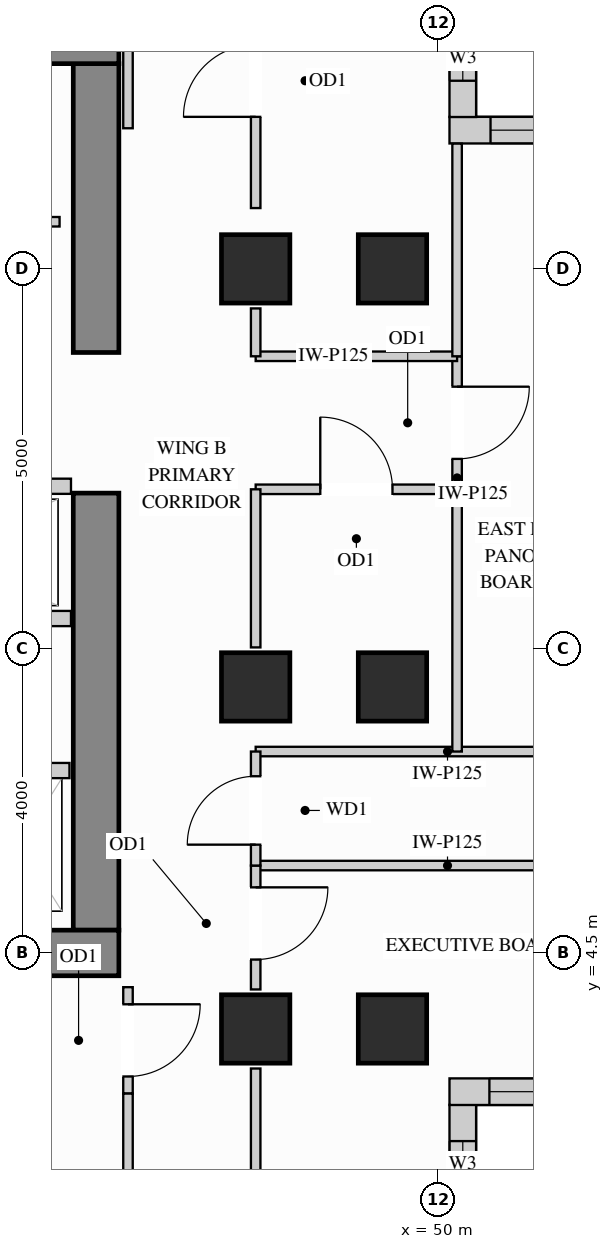
"""IFC4 building model, lengths in metres.
Left out: names, types, materials, properties, quantities, classifications, styles, units other than length and angle.
Written with IfcOpenShell. Run it as: python <this file> out.ifc"""

import sys

from ifc_helpers import new_model, si_unit, direction, frame, frame_2d, origin, origin_2d, place, context, subcontext, project, spatial, rectangle, extrude, source, transform, mapped, element, fill, save


model = new_model("IFC4")
c1 = context("Model", 3, precision=1e-05, world=origin(), true_north=direction((0.0, 1.0)))
c2 = subcontext(c1, "Body", "Model", "MODEL_VIEW")
j1 = project(units=[si_unit("LENGTHUNIT", "METRE"), si_unit("PLANEANGLEUNIT", "RADIAN")], contexts=[c1])
p1 = place(None, origin())
s1 = spatial("IfcSite", under=j1, at=p1, CompositionType="ELEMENT")
p2 = place(p1, origin())
s2 = spatial("IfcBuilding", under=s1, at=p2, CompositionType="ELEMENT")
p3 = place(p2, frame((0.0, 0.0, 204.3)))
s3 = spatial("IfcBuildingStorey", under=s2, at=p3, CompositionType="ELEMENT", Elevation=204.3)
m1 = source(origin(), c2, "Body", "SweptSolid", [
    extrude(rectangle(XDim=0.9, YDim=0.9, at=origin_2d()), origin(), (0.0, 0.0, 1.0), 3.32),
])
for number, where, z_axis, x_axis in (
    (1, (47.6, 13.5, 0.0), (0.0, 0.0, 1.0), (1.0, 0.0, 0.0)),
    (2, (47.6, 3.5, 0.0), (0.0, 0.0, 1.0), (1.0, 0.0, 0.0)),
    (3, (47.6, 8.0, 0.0), (0.0, 0.0, 1.0), (1.0, 0.0, 0.0)),
    (4, (49.4, 13.5, 0.0), (0.0, 0.0, 1.0), (1.0, 0.0, 0.0)),
    (5, (49.4, 3.5, 0.0), (0.0, 0.0, 1.0), (1.0, 0.0, 0.0)),
    (6, (49.4, 8.0, 0.0), (0.0, 0.0, 1.0), (1.0, 0.0, 0.0)),
):
    element("IfcColumn", number, at=place(p3, frame(where, z_axis=z_axis, x_axis=x_axis)), inside=s3, PredefinedType="COLUMN", context=c2, shape_type="MappedRepresentation", body=[
        mapped(m1, transform((0.0, 0.0, 0.0), x_axis=(1.0, 0.0, 0.0), y_axis=(0.0, 1.0, 0.0), z_axis=(0.0, 0.0, 1.0))),
    ])
m2 = source(origin(), c2, "Body", "SweptSolid", [
    extrude(rectangle(XDim=5.75, YDim=0.6, at=frame_2d((2.875, 0.0))), origin(), (0.0, 0.0, 1.0), 3.32),
])
p4 = place(p3, frame((45.5, 4.8, 0.0), z_axis=(0.0, 0.0, 1.0), x_axis=(0.0, 1.0, 0.0)))
e7 = element("IfcWall", 7, at=p4, inside=s3, PredefinedType="SHEAR", context=c2, shape_type="MappedRepresentation", body=[
    mapped(m2, transform((0.0, 0.0, 0.0), x_axis=(1.0, 0.0, 0.0), y_axis=(0.0, 1.0, 0.0), z_axis=(0.0, 0.0, 1.0))),
])
m3 = source(origin(), c2, "Body", "SweptSolid", [
    extrude(rectangle(XDim=3.8, YDim=0.6, at=frame_2d((1.9, 0.0))), origin(), (0.0, 0.0, 1.0), 3.32),
])
p5 = place(p3, frame((45.5, 12.4, 0.0), z_axis=(0.0, 0.0, 1.0), x_axis=(0.0, 1.0, 0.0)))
e8 = element("IfcWall", 8, at=p5, inside=s3, PredefinedType="SHEAR", context=c2, shape_type="MappedRepresentation", body=[
    mapped(m3, transform((0.0, 0.0, 0.0), x_axis=(1.0, 0.0, 0.0), y_axis=(0.0, 1.0, 0.0), z_axis=(0.0, 0.0, 1.0))),
])
m4 = source(origin(), c2, "Body", "SweptSolid", [
    extrude(rectangle(XDim=10.1, YDim=0.6, at=frame_2d((5.05, 0.0))), origin(), (0.0, 0.0, 1.0), 3.32),
])
for number, where, z_axis, x_axis in (
    (9, (35.7, 16.5, 0.0), (0.0, 0.0, 1.0), (1.0, 0.0, 0.0)),
    (10, (35.7, 4.5, 0.0), (0.0, 0.0, 1.0), (1.0, 0.0, 0.0)),
):
    element("IfcWall", number, at=place(p3, frame(where, z_axis=z_axis, x_axis=x_axis)), inside=s3, PredefinedType="SHEAR", context=c2, shape_type="MappedRepresentation", body=[
        mapped(m4, transform((0.0, 0.0, 0.0), x_axis=(1.0, 0.0, 0.0), y_axis=(0.0, 1.0, 0.0), z_axis=(0.0, 0.0, 1.0))),
    ])
p6 = place(p3, frame((50.325, 0.348, 0.0), z_axis=(0.0, 0.0, 1.0), x_axis=(0.0, 1.0, 0.0)))
e11 = element("IfcWall", 11, at=p6, inside=s3, PredefinedType="SOLIDWALL", context=c2, shape_type="SweptSolid", body=[
    extrude(rectangle(XDim=2.154, YDim=0.35, at=frame_2d((1.077, 0.0))), origin(), (0.0, 0.0, 1.0), 3.305),
])
p7 = place(p6, frame((0.477, 0.0, 0.78)))
e12 = element("IfcOpeningElement", 12, at=p7, cuts=e11, PredefinedType="OPENING", context=c2, shape_type="SweptSolid", body=[
    extrude(rectangle(XDim=1.2, YDim=2.1, at=frame_2d((0.6, 1.05))), frame((0.0, 0.185, 0.0), z_axis=(0.0, -1.0, 0.0), x_axis=(1.0, 0.0, 0.0)), (0.0, 0.0, 1.0), 0.37),
])
p8 = place(p3, frame((50.15, 2.675, 0.0), z_axis=(0.0, 0.0, 1.0), x_axis=(1.0, 0.0, 0.0)))
e13 = element("IfcWall", 13, at=p8, inside=s3, PredefinedType="SOLIDWALL", context=c2, shape_type="SweptSolid", body=[
    extrude(rectangle(XDim=2.85, YDim=0.35, at=frame_2d((1.425, 0.0))), origin(), (0.0, 0.0, 1.0), 3.305),
])
p9 = place(p8, frame((0.525, 0.0, 0.78)))
e14 = element("IfcOpeningElement", 14, at=p9, cuts=e13, PredefinedType="OPENING", context=c2, shape_type="SweptSolid", body=[
    extrude(rectangle(XDim=1.8, YDim=2.1, at=frame_2d((0.9, 1.05))), frame((0.0, 0.185, 0.0), z_axis=(0.0, -1.0, 0.0), x_axis=(1.0, 0.0, 0.0)), (0.0, 0.0, 1.0), 0.37),
])
p10 = place(p3, frame((53.0, 15.325, 0.0), z_axis=(0.0, 0.0, 1.0), x_axis=(-1.0, 0.0, 0.0)))
e15 = element("IfcWall", 15, at=p10, inside=s3, PredefinedType="SOLIDWALL", context=c2, shape_type="SweptSolid", body=[
    extrude(rectangle(XDim=2.85, YDim=0.35, at=frame_2d((1.425, 0.0))), origin(), (0.0, 0.0, 1.0), 3.305),
])
p11 = place(p10, frame((0.51, 0.0, 0.78)))
e16 = element("IfcOpeningElement", 16, at=p11, cuts=e15, PredefinedType="OPENING", context=c2, shape_type="SweptSolid", body=[
    extrude(rectangle(XDim=1.8, YDim=2.1, at=frame_2d((0.9, 1.05))), frame((0.0, 0.185, 0.0), z_axis=(0.0, -1.0, 0.0), x_axis=(1.0, 0.0, 0.0)), (0.0, 0.0, 1.0), 0.37),
])
p12 = place(p3, frame((50.325, 15.498, 0.0), z_axis=(0.0, 0.0, 1.0), x_axis=(0.0, 1.0, 0.0)))
e17 = element("IfcWall", 17, at=p12, inside=s3, PredefinedType="SOLIDWALL", context=c2, shape_type="SweptSolid", body=[
    extrude(rectangle(XDim=2.154, YDim=0.35, at=frame_2d((1.077, 0.0))), origin(), (0.0, 0.0, 1.0), 3.305),
])
p13 = place(p12, frame((0.477, 0.0, 0.78)))
e18 = element("IfcOpeningElement", 18, at=p13, cuts=e17, PredefinedType="OPENING", context=c2, shape_type="SweptSolid", body=[
    extrude(rectangle(XDim=1.2, YDim=2.1, at=frame_2d((0.6, 1.05))), frame((0.0, 0.185, 0.0), z_axis=(0.0, -1.0, 0.0), x_axis=(1.0, 0.0, 0.0)), (0.0, 0.0, 1.0), 0.37),
])
p14 = place(p3, frame((40.75, 14.12, 0.0), z_axis=(0.0, 0.0, 1.0), x_axis=(1.0, 0.0, 0.0)))
e19 = element("IfcWall", 19, at=p14, inside=s3, PredefinedType="PARTITIONING", context=c2, shape_type="SweptSolid", body=[
    extrude(rectangle(XDim=4.27, YDim=0.125, at=frame_2d((2.135, 0.0))), origin(), (0.0, 0.0, 1.0), 3.305),
])
p15 = place(p14, frame((1.66, 0.0, 0.0)))
e20 = element("IfcOpeningElement", 20, at=p15, cuts=e19, PredefinedType="OPENING", context=c2, shape_type="SweptSolid", body=[
    extrude(rectangle(XDim=0.95, YDim=2.15, at=frame_2d((0.475, 1.075))), frame((0.0, 0.073, 0.0), z_axis=(0.0, -1.0, 0.0), x_axis=(1.0, 0.0, 0.0)), (0.0, 0.0, 1.0), 0.145),
])
p16 = place(p3, frame((50.25, 10.6, 0.0), z_axis=(0.0, 0.0, 1.0), x_axis=(0.0, 1.0, 0.0)))
e21 = element("IfcWall", 21, at=p16, inside=s3, PredefinedType="PARTITIONING", context=c2, shape_type="SweptSolid", body=[
    extrude(rectangle(XDim=1.75, YDim=0.125, at=frame_2d((0.875, 0.0))), origin(), (0.0, 0.0, 1.0), 3.305),
])
p17 = place(p16, frame((0.4, 0.0, 0.0)))
e22 = element("IfcOpeningElement", 22, at=p17, cuts=e21, PredefinedType="OPENING", context=c2, shape_type="SweptSolid", body=[
    extrude(rectangle(XDim=0.95, YDim=2.15, at=frame_2d((0.475, 1.075))), frame((0.0, 0.073, 0.0), z_axis=(0.0, -1.0, 0.0), x_axis=(1.0, 0.0, 0.0)), (0.0, 0.0, 1.0), 0.145),
])
m5 = source(origin(), c2, "Body", "SweptSolid", [
    extrude(rectangle(XDim=5.048, YDim=0.125, at=frame_2d((2.524, 0.0))), origin(), (0.0, 0.0, 1.0), 3.305),
])
for number, where, z_axis, x_axis in (
    (23, (47.6, 5.65, 0.0), (0.0, 0.0, 1.0), (1.0, 0.0, 0.0)),
    (24, (47.6, 7.15, 0.0), (0.0, 0.0, 1.0), (1.0, 0.0, 0.0)),
):
    element("IfcWall", number, at=place(p3, frame(where, z_axis=z_axis, x_axis=x_axis)), inside=s3, PredefinedType="PARTITIONING", context=c2, shape_type="MappedRepresentation", body=[
        mapped(m5, transform((0.0, 0.0, 0.0), x_axis=(1.0, 0.0, 0.0), y_axis=(0.0, 1.0, 0.0), z_axis=(0.0, 0.0, 1.0))),
    ])
m6 = source(origin(), c2, "Body", "SweptSolid", [
    extrude(rectangle(XDim=2.65, YDim=0.125, at=frame_2d((1.325, 0.0))), origin(), (0.0, 0.0, 1.0), 3.305),
])
p18 = place(p3, frame((47.6, 12.35, 0.0), z_axis=(0.0, 0.0, 1.0), x_axis=(1.0, 0.0, 0.0)))
e25 = element("IfcWall", 25, at=p18, inside=s3, PredefinedType="PARTITIONING", context=c2, shape_type="MappedRepresentation", body=[
    mapped(m6, transform((0.0, 0.0, 0.0), x_axis=(1.0, 0.0, 0.0), y_axis=(0.0, 1.0, 0.0), z_axis=(0.0, 0.0, 1.0))),
])
p19 = place(p3, frame((47.6, 10.6, 0.0), z_axis=(0.0, 0.0, 1.0), x_axis=(1.0, 0.0, 0.0)))
e26 = element("IfcWall", 26, at=p19, inside=s3, PredefinedType="PARTITIONING", context=c2, shape_type="SweptSolid", body=[
    extrude(rectangle(XDim=2.65, YDim=0.125, at=frame_2d((1.325, 0.0))), origin(), (0.0, 0.0, 1.0), 2.693),
])
p20 = place(p19, frame((0.85, 0.0, 0.0)))
e27 = element("IfcOpeningElement", 27, at=p20, cuts=e26, PredefinedType="OPENING", context=c2, shape_type="SweptSolid", body=[
    extrude(rectangle(XDim=0.95, YDim=2.15, at=frame_2d((0.475, 1.075))), frame((0.0, 0.073, 0.0), z_axis=(0.0, -1.0, 0.0), x_axis=(1.0, 0.0, 0.0)), (0.0, 0.0, 1.0), 0.145),
])
m7 = source(origin(), c2, "Body", "SweptSolid", [
    extrude(rectangle(XDim=3.45, YDim=0.125, at=frame_2d((1.725, 0.0))), origin(), (0.0, 0.0, 1.0), 3.305),
])
p21 = place(p3, frame((50.25, 7.15, 0.0), z_axis=(0.0, 0.0, 1.0), x_axis=(0.0, 1.0, 0.0)))
e28 = element("IfcWall", 28, at=p21, inside=s3, PredefinedType="PARTITIONING", context=c2, shape_type="MappedRepresentation", body=[
    mapped(m7, transform((0.0, 0.0, 0.0), x_axis=(1.0, 0.0, 0.0), y_axis=(0.0, 1.0, 0.0), z_axis=(0.0, 0.0, 1.0))),
])
m8 = source(origin(), c2, "Body", "SweptSolid", [
    extrude(rectangle(XDim=2.798, YDim=0.125, at=frame_2d((1.399, 0.0))), origin(), (0.0, 0.0, 1.0), 3.305),
])
p22 = place(p3, frame((50.25, 12.35, 0.0), z_axis=(0.0, 0.0, 1.0), x_axis=(0.0, 1.0, 0.0)))
e29 = element("IfcWall", 29, at=p22, inside=s3, PredefinedType="PARTITIONING", context=c2, shape_type="MappedRepresentation", body=[
    mapped(m8, transform((0.0, 0.0, 0.0), x_axis=(1.0, 0.0, 0.0), y_axis=(0.0, 1.0, 0.0), z_axis=(0.0, 0.0, 1.0))),
])
p23 = place(p3, frame((47.6, 4.02, 0.0), z_axis=(0.0, 0.0, 1.0), x_axis=(0.0, 1.0, 0.0)))
e30 = element("IfcWall", 30, at=p23, inside=s3, PredefinedType="PARTITIONING", context=c2, shape_type="SweptSolid", body=[
    extrude(rectangle(XDim=1.63, YDim=0.125, at=frame_2d((0.815, 0.0))), origin(), (0.0, 0.0, 1.0), 2.693),
])
p24 = place(p23, frame((0.393, 0.0, 0.0)))
e31 = element("IfcOpeningElement", 31, at=p24, cuts=e30, PredefinedType="OPENING", context=c2, shape_type="SweptSolid", body=[
    extrude(rectangle(XDim=0.95, YDim=2.15, at=frame_2d((0.475, 1.075))), frame((0.0, 0.073, 0.0), z_axis=(0.0, -1.0, 0.0), x_axis=(1.0, 0.0, 0.0)), (0.0, 0.0, 1.0), 0.145),
])
m9 = source(origin(), c2, "Body", "SweptSolid", [
    extrude(rectangle(XDim=1.86, YDim=0.125, at=frame_2d((0.93, 0.0))), origin(), (0.0, 0.0, 1.0), 2.693),
])
p25 = place(p3, frame((47.6, 1.12, 0.0), z_axis=(0.0, 0.0, 1.0), x_axis=(0.0, 1.0, 0.0)))
e32 = element("IfcWall", 32, at=p25, inside=s3, PredefinedType="PARTITIONING", context=c2, shape_type="MappedRepresentation", body=[
    mapped(m9, transform((0.0, 0.0, 0.0), x_axis=(1.0, 0.0, 0.0), y_axis=(0.0, 1.0, 0.0), z_axis=(0.0, 0.0, 1.0))),
])
m10 = source(origin(), c2, "Body", "SweptSolid", [
    extrude(rectangle(XDim=2.08, YDim=0.125, at=frame_2d((1.04, 0.0))), origin(), (0.0, 0.0, 1.0), 2.693),
])
p26 = place(p3, frame((47.6, 8.52, 0.0), z_axis=(0.0, 0.0, 1.0), x_axis=(0.0, 1.0, 0.0)))
e33 = element("IfcWall", 33, at=p26, inside=s3, PredefinedType="PARTITIONING", context=c2, shape_type="MappedRepresentation", body=[
    mapped(m10, transform((0.0, 0.0, 0.0), x_axis=(1.0, 0.0, 0.0), y_axis=(0.0, 1.0, 0.0), z_axis=(0.0, 0.0, 1.0))),
])
p27 = place(p3, frame((47.6, 14.3, 0.0), z_axis=(0.0, 0.0, 1.0), x_axis=(0.0, 1.0, 0.0)))
e34 = element("IfcWall", 34, at=p27, inside=s3, PredefinedType="PARTITIONING", context=c2, shape_type="SweptSolid", body=[
    extrude(rectangle(XDim=2.58, YDim=0.125, at=frame_2d((1.29, 0.0))), origin(), (0.0, 0.0, 1.0), 2.693),
])
p28 = place(p27, frame((1.2, 0.0, 0.0)))
e35 = element("IfcOpeningElement", 35, at=p28, cuts=e34, PredefinedType="OPENING", context=c2, shape_type="SweptSolid", body=[
    extrude(rectangle(XDim=0.95, YDim=2.15, at=frame_2d((0.475, 1.075))), frame((0.0, 0.073, 0.0), z_axis=(0.0, -1.0, 0.0), x_axis=(1.0, 0.0, 0.0)), (0.0, 0.0, 1.0), 0.145),
])
m11 = source(origin(), c2, "Body", "SweptSolid", [
    extrude(rectangle(XDim=0.63, YDim=0.125, at=frame_2d((0.315, 0.0))), origin(), (0.0, 0.0, 1.0), 2.693),
])
p29 = place(p3, frame((47.6, 12.35, 0.0), z_axis=(0.0, 0.0, 1.0), x_axis=(0.0, 1.0, 0.0)))
e36 = element("IfcWall", 36, at=p29, inside=s3, PredefinedType="PARTITIONING", context=c2, shape_type="MappedRepresentation", body=[
    mapped(m11, transform((0.0, 0.0, 0.0), x_axis=(1.0, 0.0, 0.0), y_axis=(0.0, 1.0, 0.0), z_axis=(0.0, 0.0, 1.0))),
])
p30 = place(p3, frame((47.6, 5.65, 0.0), z_axis=(0.0, 0.0, 1.0), x_axis=(0.0, 1.0, 0.0)))
e37 = element("IfcWall", 37, at=p30, inside=s3, PredefinedType="PARTITIONING", context=c2, shape_type="SweptSolid", body=[
    extrude(rectangle(XDim=1.5, YDim=0.125, at=frame_2d((0.75, 0.0))), origin(), (0.0, 0.0, 1.0), 2.693),
])
p31 = place(p30, frame((0.275, 0.0, 0.0)))
e38 = element("IfcOpeningElement", 38, at=p31, cuts=e37, PredefinedType="OPENING", context=c2, shape_type="SweptSolid", body=[
    extrude(rectangle(XDim=0.9, YDim=2.15, at=frame_2d((0.45, 1.075))), frame((0.0, 0.073, 0.0), z_axis=(0.0, -1.0, 0.0), x_axis=(1.0, 0.0, 0.0)), (0.0, 0.0, 1.0), 0.145),
])
m12 = source(origin(), c2, "Body", "SweptSolid", [
    extrude(rectangle(XDim=2.298, YDim=0.125, at=frame_2d((1.149, 0.0))), origin(), (0.0, 0.0, 1.0), 3.305),
])
p32 = place(p3, frame((45.92, 15.35, 0.0), z_axis=(0.0, 0.0, 1.0), x_axis=(0.0, 1.0, 0.0)))
e39 = element("IfcWall", 39, at=p32, inside=s3, PredefinedType="PARTITIONING", context=c2, shape_type="MappedRepresentation", body=[
    mapped(m12, transform((0.0, 0.0, 0.0), x_axis=(1.0, 0.0, 0.0), y_axis=(0.0, 1.0, 0.0), z_axis=(0.0, 0.0, 1.0))),
])
p33 = place(p3, frame((45.92, 2.65, 0.0), z_axis=(0.0, 0.0, 1.0), x_axis=(0.0, 1.0, 0.0)))
e40 = element("IfcWall", 40, at=p33, inside=s3, PredefinedType="PARTITIONING", context=c2, shape_type="SweptSolid", body=[
    extrude(rectangle(XDim=1.4, YDim=0.125, at=frame_2d((0.7, 0.0))), origin(), (0.0, 0.0, 1.0), 3.305),
])
p34 = place(p33, frame((0.225, 0.0, 0.0)))
e41 = element("IfcOpeningElement", 41, at=p34, cuts=e40, PredefinedType="OPENING", context=c2, shape_type="SweptSolid", body=[
    extrude(rectangle(XDim=0.95, YDim=2.15, at=frame_2d((0.475, 1.075))), frame((0.0, 0.073, 0.0), z_axis=(0.0, -1.0, 0.0), x_axis=(1.0, 0.0, 0.0)), (0.0, 0.0, 1.0), 0.145),
])
p35 = place(p3, frame((45.92, 0.352, 0.0), z_axis=(0.0, 0.0, 1.0), x_axis=(0.0, 1.0, 0.0)))
e42 = element("IfcWall", 42, at=p35, inside=s3, PredefinedType="PARTITIONING", context=c2, shape_type="MappedRepresentation", body=[
    mapped(m12, transform((0.0, 0.0, 0.0), x_axis=(1.0, 0.0, 0.0), y_axis=(0.0, 1.0, 0.0), z_axis=(0.0, 0.0, 1.0))),
])
m13 = source(origin(), c2, "Body", "SweptSolid", [
    extrude(rectangle(XDim=1.3, YDim=0.2, at=frame_2d((0.65, 0.0))), origin(), (0.0, 0.0, 1.0), 3.305),
])
p36 = place(p3, frame((43.85, 6.9, 0.0), z_axis=(0.0, 0.0, 1.0), x_axis=(1.0, 0.0, 0.0)))
e43 = element("IfcWall", 43, at=p36, inside=s3, PredefinedType="PARTITIONING", context=c2, shape_type="MappedRepresentation", body=[
    mapped(m13, transform((0.0, 0.0, 0.0), x_axis=(1.0, 0.0, 0.0), y_axis=(0.0, 1.0, 0.0), z_axis=(0.0, 0.0, 1.0))),
])
m14 = source(origin(), c2, "Body", "SweptSolid", [
    extrude(rectangle(XDim=3.49, YDim=0.2, at=frame_2d((1.745, 0.0))), origin(), (0.0, 0.0, 1.0), 3.305),
])
for number, where, z_axis, x_axis in (
    (44, (41.68, 10.64, 0.0), (0.0, 0.0, 1.0), (1.0, 0.0, 0.0)),
    (45, (41.68, 8.9, 0.0), (0.0, 0.0, 1.0), (1.0, 0.0, 0.0)),
):
    element("IfcWall", number, at=place(p3, frame(where, z_axis=z_axis, x_axis=x_axis)), inside=s3, PredefinedType="PARTITIONING", context=c2, shape_type="MappedRepresentation", body=[
        mapped(m14, transform((0.0, 0.0, 0.0), x_axis=(1.0, 0.0, 0.0), y_axis=(0.0, 1.0, 0.0), z_axis=(0.0, 0.0, 1.0))),
    ])
m15 = source(origin(), c2, "Body", "SweptSolid", [
    extrude(rectangle(XDim=0.95, YDim=2.15, at=frame_2d((0.475, 1.075))), frame((0.0, 0.025, 0.0), z_axis=(0.0, -1.0, 0.0), x_axis=(1.0, 0.0, 0.0)), (0.0, 0.0, 1.0), 0.05),
])
p37 = place(p34, origin())
e46 = element("IfcDoor", 46, at=p37, inside=s3, OperationType="SINGLE_SWING_RIGHT", PredefinedType="DOOR", context=c2, shape_type="MappedRepresentation", body=[
    mapped(m15, transform((0.0, 0.0, 0.0), x_axis=(1.0, 0.0, 0.0), y_axis=(0.0, 1.0, 0.0), z_axis=(0.0, 0.0, 1.0))),
])
fill(e41, e46)
p38 = place(p24, origin())
e47 = element("IfcDoor", 47, at=p38, inside=s3, OperationType="SINGLE_SWING_RIGHT", PredefinedType="DOOR", context=c2, shape_type="MappedRepresentation", body=[
    mapped(m15, transform((0.0, 0.0, 0.0), x_axis=(1.0, 0.0, 0.0), y_axis=(0.0, 1.0, 0.0), z_axis=(0.0, 0.0, 1.0))),
])
fill(e31, e47)
p39 = place(p20, origin())
e48 = element("IfcDoor", 48, at=p39, inside=s3, OperationType="SINGLE_SWING_LEFT", PredefinedType="DOOR", context=c2, shape_type="MappedRepresentation", body=[
    mapped(m15, transform((0.0, 0.0, 0.0), x_axis=(1.0, 0.0, 0.0), y_axis=(0.0, 1.0, 0.0), z_axis=(0.0, 0.0, 1.0))),
])
fill(e27, e48)
p40 = place(p17, origin())
e49 = element("IfcDoor", 49, at=p40, inside=s3, OperationType="SINGLE_SWING_RIGHT", PredefinedType="DOOR", context=c2, shape_type="MappedRepresentation", body=[
    mapped(m15, transform((0.0, 0.0, 0.0), x_axis=(1.0, 0.0, 0.0), y_axis=(0.0, 1.0, 0.0), z_axis=(0.0, 0.0, 1.0))),
])
fill(e22, e49)
p41 = place(p28, origin())
e50 = element("IfcDoor", 50, at=p41, inside=s3, OperationType="SINGLE_SWING_LEFT", PredefinedType="DOOR", context=c2, shape_type="MappedRepresentation", body=[
    mapped(m15, transform((0.0, 0.0, 0.0), x_axis=(1.0, 0.0, 0.0), y_axis=(0.0, 1.0, 0.0), z_axis=(0.0, 0.0, 1.0))),
])
fill(e35, e50)
m16 = source(origin(), c2, "Body", "SweptSolid", [
    extrude(rectangle(XDim=0.9, YDim=2.15, at=frame_2d((0.45, 1.075))), frame((0.0, 0.025, 0.0), z_axis=(0.0, -1.0, 0.0), x_axis=(1.0, 0.0, 0.0)), (0.0, 0.0, 1.0), 0.05),
])
p42 = place(p31, origin())
e51 = element("IfcDoor", 51, at=p42, inside=s3, OperationType="SINGLE_SWING_LEFT", PredefinedType="DOOR", context=c2, shape_type="MappedRepresentation", body=[
    mapped(m16, transform((0.0, 0.0, 0.0), x_axis=(1.0, 0.0, 0.0), y_axis=(0.0, 1.0, 0.0), z_axis=(0.0, 0.0, 1.0))),
])
fill(e38, e51)
m17 = source(origin(), c2, "Body", "SweptSolid", [
    extrude(rectangle(XDim=1.8, YDim=2.1, at=frame_2d((0.9, 1.05))), frame((0.0, 0.03, 0.0), z_axis=(0.0, -1.0, 0.0), x_axis=(1.0, 0.0, 0.0)), (0.0, 0.0, 1.0), 0.06),
])
p43 = place(p9, origin())
e52 = element("IfcWindow", 52, at=p43, inside=s3, PartitioningType="SINGLE_PANEL", PredefinedType="WINDOW", context=c2, shape_type="MappedRepresentation", body=[
    mapped(m17, transform((0.0, 0.0, 0.0), x_axis=(1.0, 0.0, 0.0), y_axis=(0.0, 1.0, 0.0), z_axis=(0.0, 0.0, 1.0))),
])
fill(e14, e52)
p44 = place(p11, origin())
e53 = element("IfcWindow", 53, at=p44, inside=s3, PartitioningType="SINGLE_PANEL", PredefinedType="WINDOW", context=c2, shape_type="MappedRepresentation", body=[
    mapped(m17, transform((0.0, 0.0, 0.0), x_axis=(1.0, 0.0, 0.0), y_axis=(0.0, 1.0, 0.0), z_axis=(0.0, 0.0, 1.0))),
])
fill(e16, e53)
m18 = source(origin(), c2, "Body", "SweptSolid", [
    extrude(rectangle(XDim=1.2, YDim=2.1, at=frame_2d((0.6, 1.05))), frame((0.0, 0.03, 0.0), z_axis=(0.0, -1.0, 0.0), x_axis=(1.0, 0.0, 0.0)), (0.0, 0.0, 1.0), 0.06),
])
p45 = place(p7, origin())
e54 = element("IfcWindow", 54, at=p45, inside=s3, PartitioningType="SINGLE_PANEL", PredefinedType="WINDOW", context=c2, shape_type="MappedRepresentation", body=[
    mapped(m18, transform((0.0, 0.0, 0.0), x_axis=(1.0, 0.0, 0.0), y_axis=(0.0, 1.0, 0.0), z_axis=(0.0, 0.0, 1.0))),
])
fill(e12, e54)
p46 = place(p13, origin())
e55 = element("IfcWindow", 55, at=p46, inside=s3, PartitioningType="SINGLE_PANEL", PredefinedType="WINDOW", context=c2, shape_type="MappedRepresentation", body=[
    mapped(m18, transform((0.0, 0.0, 0.0), x_axis=(1.0, 0.0, 0.0), y_axis=(0.0, 1.0, 0.0), z_axis=(0.0, 0.0, 1.0))),
])
fill(e18, e55)
save(model, sys.argv[1])
